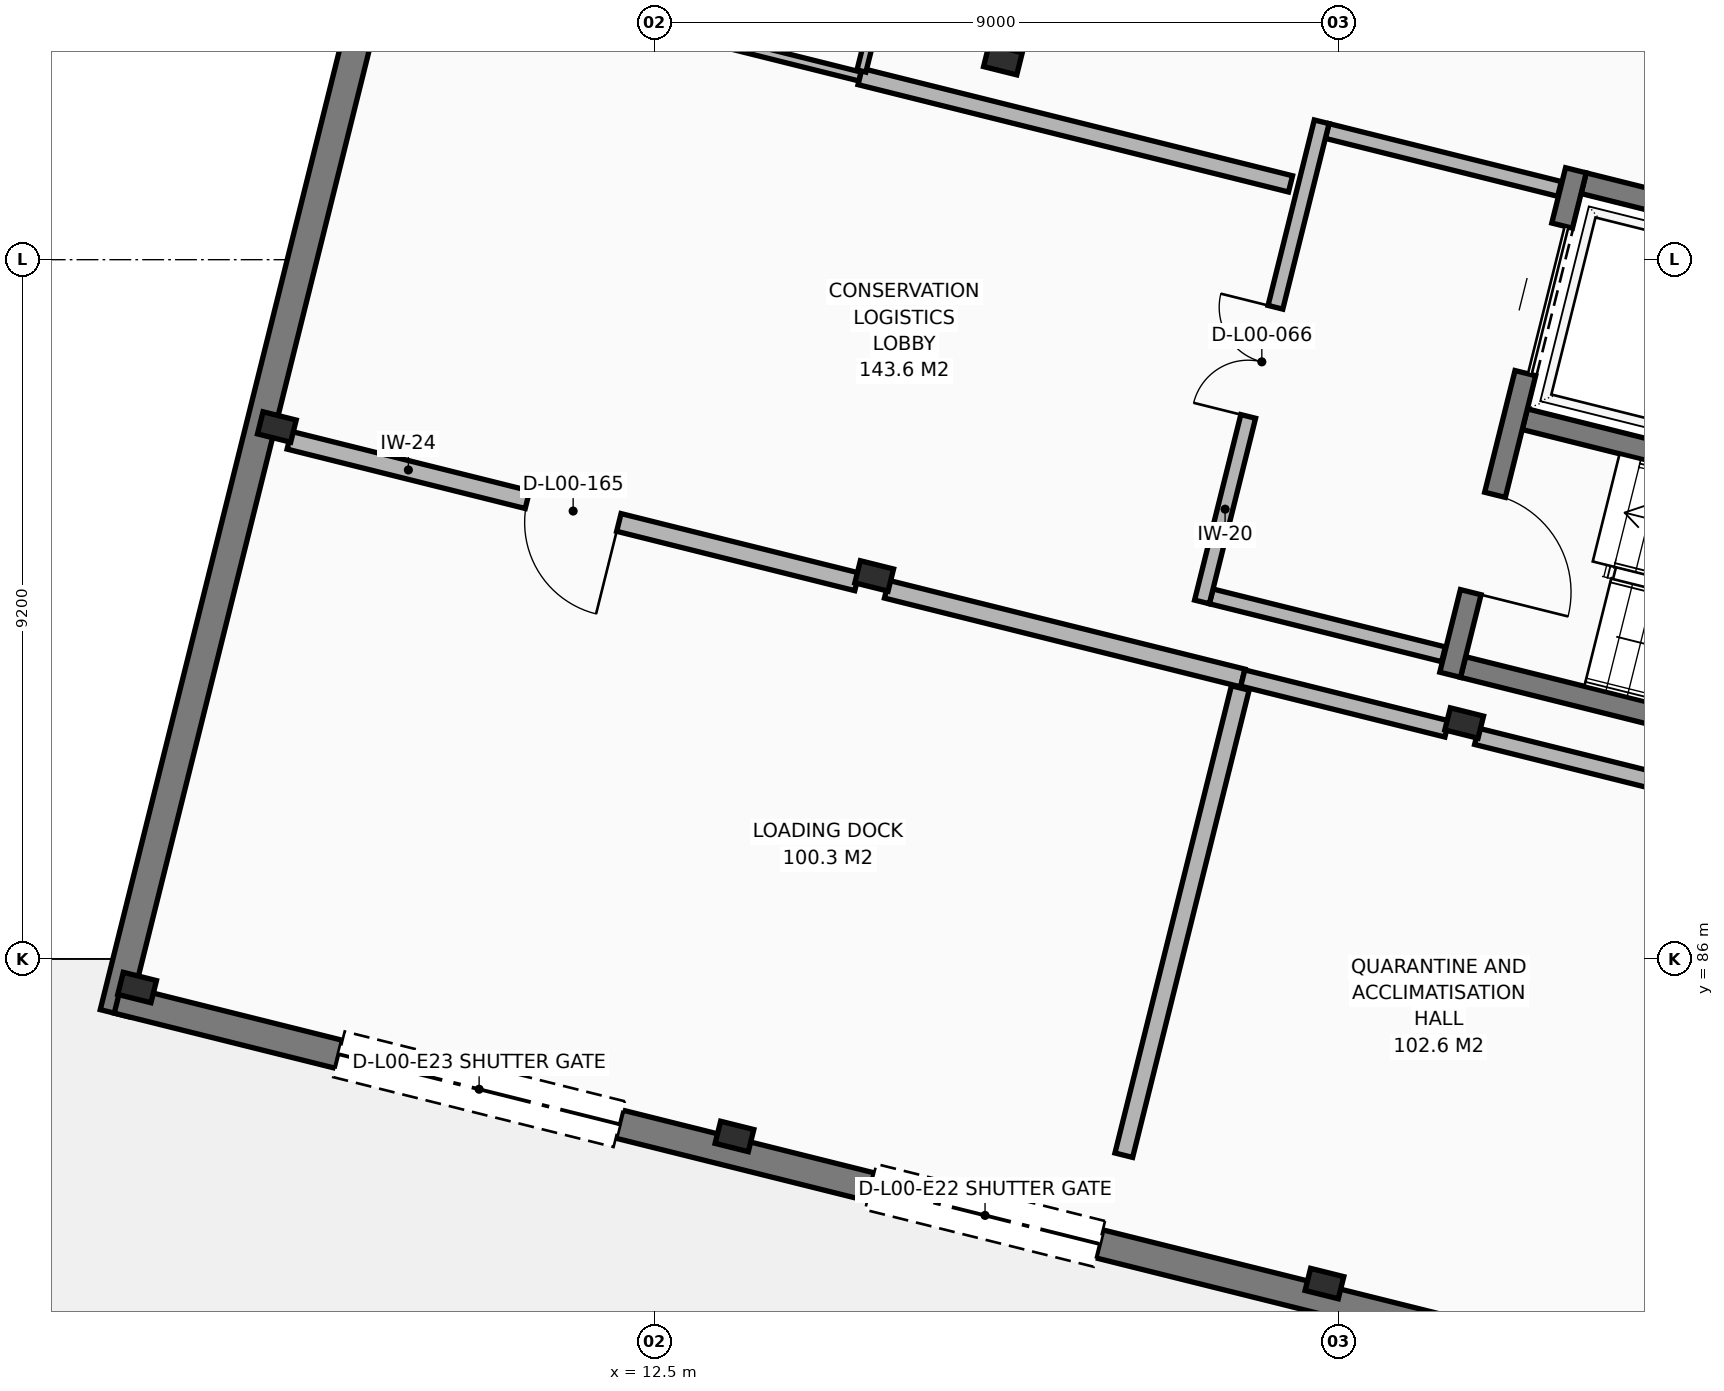
"""IFC4 building model, lengths in metres.
Left out: names, types, materials, properties, quantities, classifications, styles, units other than length and angle.
Written with IfcOpenShell. Run it as: python <this file> out.ifc"""

import sys

from ifc_helpers import new_model, si_unit, direction, frame, frame_2d, origin, origin_2d, place, context, subcontext, project, spatial, rectangle, i_section, extrude, element, fill, save


model = new_model("IFC4")
c1 = context("Model", 3, precision=1e-05, world=origin(), true_north=direction((0.0, 1.0)))
c2 = subcontext(c1, "Body", "Model", "MODEL_VIEW")
j1 = project(units=[si_unit("LENGTHUNIT", "METRE"), si_unit("PLANEANGLEUNIT", "RADIAN")], contexts=[c1])
p1 = place(None, origin())
s1 = spatial("IfcSite", under=j1, at=p1, CompositionType="ELEMENT")
p2 = place(p1, origin())
s2 = spatial("IfcBuilding", under=s1, at=p2, CompositionType="ELEMENT")
p3 = place(p2, origin())
s3 = spatial("IfcBuildingStorey", under=s2, at=p3, CompositionType="ELEMENT", Elevation=0.0)
for number, where, z_axis, x_axis in (
    (1, (5.693, 85.625, 0.0), (0.0, 0.0, 1.0), (0.97, -0.242, 0.0)),
    (2, (7.531, 92.999, 0.0), (0.0, 0.0, 1.0), (0.97, -0.242, 0.0)),
    (3, (13.552, 83.665, 0.0), (0.0, 0.0, 1.0), (0.97, -0.242, 0.0)),
    (4, (15.391, 91.039, 0.0), (0.0, 0.0, 1.0), (0.97, -0.242, 0.0)),
    (5, (17.084, 97.831, 0.0), (0.0, 0.0, 1.0), (0.97, -0.242, 0.0)),
    (6, (21.315, 81.73, 0.0), (0.0, 0.0, 1.0), (0.97, -0.242, 0.0)),
    (7, (23.153, 89.104, 0.0), (0.0, 0.0, 1.0), (0.97, -0.242, 0.0)),
):
    element("IfcColumn", number, at=place(p3, frame(where, z_axis=z_axis, x_axis=x_axis)), inside=s3, PredefinedType="COLUMN", context=c2, shape_type="SweptSolid", body=[
        extrude(i_section(OverallWidth=0.3, OverallDepth=0.45, WebThickness=0.014, FlangeThickness=0.026, FilletRadius=0.027, at=origin_2d()), origin(), (0.0, 0.0, 1.0), 5.1),
    ])
p4 = place(p3, frame((5.392, 85.287, 0.0), z_axis=(0.0, 0.0, 1.0), x_axis=(0.241923607661, 0.970295299409, 0.0)))
e8 = element("IfcWall", 8, at=p4, inside=s3, PredefinedType="SOLIDWALL", context=c2, shape_type="SweptSolid", body=[
    extrude(rectangle(XDim=22.81, YDim=0.38, at=frame_2d((11.405, 0.0))), origin(), (0.0, 0.0, 1.0), 4.88),
])
p5 = place(p4, frame((17.61, 0.0, 0.0)))
e9 = element("IfcOpeningElement", 9, at=p5, cuts=e8, PredefinedType="OPENING", context=c2, shape_type="SweptSolid", body=[
    extrude(rectangle(XDim=3.1, YDim=3.1, at=frame_2d((1.55, 1.55))), frame((0.0, 0.2, 0.0), z_axis=(0.0, -1.0, 0.0), x_axis=(1.0, 0.0, 0.0)), (0.0, 0.0, 1.0), 0.4),
])
p6 = place(p3, frame((37.274, 77.534, 0.0), z_axis=(0.0, 0.0, 1.0), x_axis=(-0.970295504299, 0.2419227859, 0.0)))
e10 = element("IfcWall", 10, at=p6, inside=s3, PredefinedType="SOLIDWALL", context=c2, shape_type="SweptSolid", body=[
    extrude(rectangle(XDim=32.81, YDim=0.38, at=frame_2d((16.405, 0.0))), origin(), (0.0, 0.0, 1.0), 4.88),
])
p7 = place(p6, frame((3.2, 0.0, 0.0)))
e11 = element("IfcOpeningElement", 11, at=p7, cuts=e10, PredefinedType="OPENING", context=c2, shape_type="SweptSolid", body=[
    extrude(rectangle(XDim=1.2, YDim=2.15, at=frame_2d((0.6, 1.075))), frame((0.0, 0.2, 0.0), z_axis=(0.0, -1.0, 0.0), x_axis=(1.0, 0.0, 0.0)), (0.0, 0.0, 1.0), 0.4),
])
p8 = place(p6, frame((10.7, 0.0, 0.0)))
e12 = element("IfcOpeningElement", 12, at=p8, cuts=e10, PredefinedType="OPENING", context=c2, shape_type="SweptSolid", body=[
    extrude(rectangle(XDim=3.1, YDim=3.1, at=frame_2d((1.55, 1.55))), frame((0.0, 0.2, 0.0), z_axis=(0.0, -1.0, 0.0), x_axis=(1.0, 0.0, 0.0)), (0.0, 0.0, 1.0), 0.4),
])
p9 = place(p6, frame((19.5, 0.0, 0.0)))
e13 = element("IfcOpeningElement", 13, at=p9, cuts=e10, PredefinedType="OPENING", context=c2, shape_type="SweptSolid", body=[
    extrude(rectangle(XDim=3.1, YDim=3.1, at=frame_2d((1.55, 1.55))), frame((0.0, 0.2, 0.0), z_axis=(0.0, -1.0, 0.0), x_axis=(1.0, 0.0, 0.0)), (0.0, 0.0, 1.0), 0.4),
])
p10 = place(p6, frame((26.01, 0.0, 0.0)))
e14 = element("IfcOpeningElement", 14, at=p10, cuts=e10, PredefinedType="OPENING", context=c2, shape_type="SweptSolid", body=[
    extrude(rectangle(XDim=3.8, YDim=3.5, at=frame_2d((1.9, 1.75))), frame((0.0, 0.2, 0.0), z_axis=(0.0, -1.0, 0.0), x_axis=(1.0, 0.0, 0.0)), (0.0, 0.0, 1.0), 0.4),
])
p11 = place(p3, frame((23.138, 89.841, 0.0), z_axis=(0.0, 0.0, 1.0), x_axis=(0.970295246537, -0.24192381972, 0.0)))
e15 = element("IfcWall", 15, at=p11, inside=s3, PredefinedType="SHEAR", context=c2, shape_type="SweptSolid", body=[
    extrude(rectangle(XDim=7.7, YDim=0.28, at=frame_2d((3.85, 0.0))), origin(), (0.0, 0.0, 1.0), 4.88),
])
p12 = place(p3, frame((31.422, 91.239, 0.0), z_axis=(0.0, 0.0, 1.0), x_axis=(-0.970297102167, 0.241916377137, 0.0)))
e16 = element("IfcWall", 16, at=p12, inside=s3, PredefinedType="SHEAR", context=c2, shape_type="SweptSolid", body=[
    extrude(rectangle(XDim=7.7, YDim=0.28, at=frame_2d((3.85, 0.0))), origin(), (0.0, 0.0, 1.0), 4.88),
])
p13 = place(p3, frame((28.8, 95.19, 0.0), z_axis=(0.0, 0.0, 1.0), x_axis=(-0.970292765557, 0.241933770084, 0.0)))
e17 = element("IfcWall", 17, at=p13, inside=s3, PredefinedType="SHEAR", context=c2, shape_type="SweptSolid", body=[
    extrude(rectangle(XDim=4.2, YDim=0.28, at=frame_2d((2.1, 0.0))), origin(), (0.0, 0.0, 1.0), 4.88),
])
p14 = place(p3, frame((24.623, 96.376, 0.0), z_axis=(0.0, 0.0, 1.0), x_axis=(-0.241922508616, -0.970295573434, 0.0)))
e18 = element("IfcWall", 18, at=p14, inside=s3, PredefinedType="SHEAR", context=c2, shape_type="SweptSolid", body=[
    extrude(rectangle(XDim=6.84, YDim=0.28, at=frame_2d((3.42, 0.0))), origin(), (0.0, 0.0, 1.0), 4.88),
])
p15 = place(p14, frame((0.75, 0.0, 0.0)))
e19 = element("IfcOpeningElement", 19, at=p15, cuts=e18, PredefinedType="OPENING", context=c2, shape_type="SweptSolid", body=[
    extrude(rectangle(XDim=2.0, YDim=2.3, at=frame_2d((1.0, 1.15))), frame((0.0, 0.15, 0.0), z_axis=(0.0, -1.0, 0.0), x_axis=(1.0, 0.0, 0.0)), (0.0, 0.0, 1.0), 0.3),
])
p16 = place(p14, frame((4.4, 0.0, 0.0)))
e20 = element("IfcOpeningElement", 20, at=p16, cuts=e18, PredefinedType="OPENING", context=c2, shape_type="SweptSolid", body=[
    extrude(rectangle(XDim=1.32, YDim=2.12, at=frame_2d((0.66, 1.06))), frame((0.0, 0.15, 0.0), z_axis=(0.0, -1.0, 0.0), x_axis=(1.0, 0.0, 0.0)), (0.0, 0.0, 1.0), 0.3),
])
p17 = place(p3, frame((19.824, 90.77, 0.0), z_axis=(0.0, 0.0, 1.0), x_axis=(0.970306396763, -0.241879094592, 0.0)))
e21 = element("IfcWall", 21, at=p17, inside=s3, PredefinedType="PARTITIONING", context=c2, shape_type="SweptSolid", body=[
    extrude(rectangle(XDim=3.15, YDim=0.2, at=frame_2d((1.575, 0.0))), origin(), (0.0, 0.0, 1.0), 4.88),
])
p18 = place(p3, frame((24.407, 96.131, 0.0), z_axis=(0.0, 0.0, 1.0), x_axis=(-0.970301862046, 0.241897285042, 0.0)))
e22 = element("IfcWall", 22, at=p18, inside=s3, PredefinedType="PARTITIONING", context=c2, shape_type="SweptSolid", body=[
    extrude(rectangle(XDim=3.15, YDim=0.2, at=frame_2d((1.575, 0.0))), origin(), (0.0, 0.0, 1.0), 4.37),
])
p19 = place(p3, frame((19.703, 90.698, 0.0), z_axis=(0.0, 0.0, 1.0), x_axis=(0.24192671796, 0.970294523914, 0.0)))
e23 = element("IfcWall", 23, at=p19, inside=s3, PredefinedType="PARTITIONING", context=c2, shape_type="SweptSolid", body=[
    extrude(rectangle(XDim=6.51, YDim=0.2, at=frame_2d((3.255, 0.0))), origin(), (0.0, 0.0, 1.0), 4.37),
])
p20 = place(p19, frame((2.515, 0.0, 0.0)))
e24 = element("IfcOpeningElement", 24, at=p20, cuts=e23, PredefinedType="OPENING", context=c2, shape_type="SweptSolid", body=[
    extrude(rectangle(XDim=1.48, YDim=2.15, at=frame_2d((0.74, 1.075))), frame((0.0, 0.11, 0.0), z_axis=(0.0, -1.0, 0.0), x_axis=(1.0, 0.0, 0.0)), (0.0, 0.0, 1.0), 0.22),
])
p21 = place(p3, frame((9.047, 99.145, 0.0), z_axis=(0.0, 0.0, 1.0), x_axis=(0.970298449516, -0.241910973021, 0.0)))
e25 = element("IfcWall", 25, at=p21, inside=s3, PredefinedType="PARTITIONING", context=c2, shape_type="SweptSolid", body=[
    extrude(rectangle(XDim=6.346, YDim=0.12, at=frame_2d((3.173, 0.0))), origin(), (0.0, 0.0, 1.0), 4.42),
])
p22 = place(p21, frame((2.663, 0.0, 0.0)))
e26 = element("IfcOpeningElement", 26, at=p22, cuts=e25, PredefinedType="OPENING", context=c2, shape_type="SweptSolid", body=[
    extrude(rectangle(XDim=1.02, YDim=2.12, at=frame_2d((0.51, 1.06))), frame((0.0, 0.07, 0.0), z_axis=(0.0, -1.0, 0.0), x_axis=(1.0, 0.0, 0.0)), (0.0, 0.0, 1.0), 0.14),
])
p23 = place(p3, frame((15.164, 90.962, 0.0), z_axis=(0.0, 0.0, 1.0), x_axis=(-0.970289717068, 0.24194599594, 0.0)))
e27 = element("IfcWall", 27, at=p23, inside=s3, PredefinedType="PARTITIONING", context=c2, shape_type="SweptSolid", body=[
    extrude(rectangle(XDim=7.697, YDim=0.24, at=frame_2d((3.849, 0.0))), origin(), (0.0, 0.0, 1.0), 4.37),
])
p24 = place(p23, frame((3.229, 0.0, 0.0)))
e28 = element("IfcOpeningElement", 28, at=p24, cuts=e27, PredefinedType="OPENING", context=c2, shape_type="SweptSolid", body=[
    extrude(rectangle(XDim=1.24, YDim=2.15, at=frame_2d((0.62, 1.075))), frame((0.0, 0.13, 0.0), z_axis=(0.0, -1.0, 0.0), x_axis=(1.0, 0.0, 0.0)), (0.0, 0.0, 1.0), 0.26),
])
p25 = place(p3, frame((20.24, 89.696, 0.0), z_axis=(0.0, 0.0, 1.0), x_axis=(-0.970291030499, 0.241940728553, 0.0)))
e29 = element("IfcWall", 29, at=p25, inside=s3, PredefinedType="PARTITIONING", context=c2, shape_type="SweptSolid", body=[
    extrude(rectangle(XDim=4.829, YDim=0.24, at=frame_2d((2.414, 0.0))), origin(), (0.0, 0.0, 1.0), 4.37),
])
p26 = place(p3, frame((30.689, 87.091, 0.0), z_axis=(0.0, 0.0, 1.0), x_axis=(-0.970295427473, 0.241923094029, 0.0)))
e30 = element("IfcWall", 30, at=p26, inside=s3, PredefinedType="PARTITIONING", context=c2, shape_type="SweptSolid", body=[
    extrude(rectangle(XDim=7.597, YDim=0.22, at=frame_2d((3.798, 0.0))), origin(), (0.0, 0.0, 1.0), 4.37),
])
p27 = place(p3, frame((22.927, 89.027, 0.0), z_axis=(0.0, 0.0, 1.0), x_axis=(-0.97030825466, 0.241871641452, 0.0)))
e31 = element("IfcWall", 31, at=p27, inside=s3, PredefinedType="PARTITIONING", context=c2, shape_type="SweptSolid", body=[
    extrude(rectangle(XDim=2.769, YDim=0.22, at=frame_2d((1.384, 0.0))), origin(), (0.0, 0.0, 1.0), 4.37),
])
p28 = place(p3, frame((15.205, 97.61, 0.0), z_axis=(0.0, 0.0, 1.0), x_axis=(0.970294852546, -0.241925399911, 0.0)))
e32 = element("IfcWall", 32, at=p28, inside=s3, PredefinedType="PARTITIONING", context=c2, shape_type="SweptSolid", body=[
    extrude(rectangle(XDim=5.837, YDim=0.22, at=frame_2d((2.918, 0.0))), origin(), (0.0, 0.0, 1.0), 4.42),
])
p29 = place(p3, frame((16.069, 101.073, 0.0), z_axis=(0.0, 0.0, 1.0), x_axis=(-0.241976747044, -0.970282048628, 0.0)))
e33 = element("IfcWall", 33, at=p29, inside=s3, PredefinedType="PARTITIONING", context=c2, shape_type="SweptSolid", body=[
    extrude(rectangle(XDim=3.495, YDim=0.12, at=frame_2d((1.748, 0.0))), origin(), (0.0, 0.0, 1.0), 4.37),
])
p30 = place(p3, frame((20.208, 89.565, 0.0), z_axis=(0.0, 0.0, 1.0), x_axis=(-0.241937117418, -0.970291930924, 0.0)))
e34 = element("IfcWall", 34, at=p30, inside=s3, PredefinedType="PARTITIONING", context=c2, shape_type="SweptSolid", body=[
    extrude(rectangle(XDim=6.335, YDim=0.24, at=frame_2d((3.167, 0.0))), origin(), (0.0, 0.0, 1.0), 4.37),
])
p31 = place(p9, origin())
e35 = element("IfcDoor", 35, at=p31, inside=s3, OperationType="ROLLINGUP", PredefinedType="GATE", context=c2, shape_type="SweptSolid", body=[
    extrude(rectangle(XDim=3.1, YDim=3.1, at=frame_2d((1.55, 1.55))), frame((0.0, 0.025, 0.0), z_axis=(0.0, -1.0, 0.0), x_axis=(1.0, 0.0, 0.0)), (0.0, 0.0, 1.0), 0.05),
])
fill(e13, e35)
p32 = place(p10, origin())
e36 = element("IfcDoor", 36, at=p32, inside=s3, OperationType="ROLLINGUP", PredefinedType="GATE", context=c2, shape_type="SweptSolid", body=[
    extrude(rectangle(XDim=3.8, YDim=3.5, at=frame_2d((1.9, 1.75))), frame((0.0, 0.025, 0.0), z_axis=(0.0, -1.0, 0.0), x_axis=(1.0, 0.0, 0.0)), (0.0, 0.0, 1.0), 0.05),
])
fill(e14, e36)
p33 = place(p15, origin())
e37 = element("IfcDoor", 37, at=p33, inside=s3, OperationType="SLIDING_TO_LEFT", PredefinedType="DOOR", context=c2, shape_type="SweptSolid", body=[
    extrude(rectangle(XDim=2.0, YDim=2.3, at=frame_2d((1.0, 1.15))), frame((0.0, 0.025, 0.0), z_axis=(0.0, -1.0, 0.0), x_axis=(1.0, 0.0, 0.0)), (0.0, 0.0, 1.0), 0.05),
])
fill(e19, e37)
p34 = place(p16, origin())
e38 = element("IfcDoor", 38, at=p34, inside=s3, OperationType="SINGLE_SWING_RIGHT", PredefinedType="DOOR", context=c2, shape_type="SweptSolid", body=[
    extrude(rectangle(XDim=1.32, YDim=2.12, at=frame_2d((0.66, 1.06))), frame((0.0, 0.025, 0.0), z_axis=(0.0, -1.0, 0.0), x_axis=(1.0, 0.0, 0.0)), (0.0, 0.0, 1.0), 0.05),
])
fill(e20, e38)
p35 = place(p20, origin())
e39 = element("IfcDoor", 39, at=p35, inside=s3, OperationType="DOUBLE_DOOR_SINGLE_SWING", PredefinedType="DOOR", context=c2, shape_type="SweptSolid", body=[
    extrude(rectangle(XDim=1.48, YDim=2.15, at=frame_2d((0.74, 1.075))), frame((0.0, 0.025, 0.0), z_axis=(0.0, -1.0, 0.0), x_axis=(1.0, 0.0, 0.0)), (0.0, 0.0, 1.0), 0.05),
])
fill(e24, e39)
p36 = place(p24, origin())
e40 = element("IfcDoor", 40, at=p36, inside=s3, OperationType="SINGLE_SWING_LEFT", PredefinedType="DOOR", context=c2, shape_type="SweptSolid", body=[
    extrude(rectangle(XDim=1.24, YDim=2.15, at=frame_2d((0.62, 1.075))), frame((0.0, 0.025, 0.0), z_axis=(0.0, -1.0, 0.0), x_axis=(1.0, 0.0, 0.0)), (0.0, 0.0, 1.0), 0.05),
])
fill(e28, e40)
save(model, sys.argv[1])
